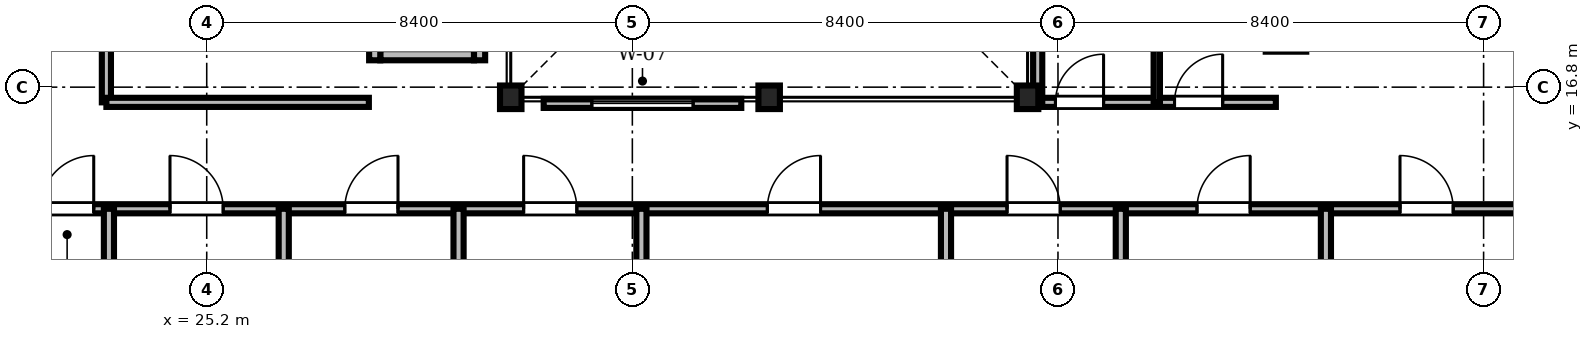
"""IFC4 building model, lengths in metres.
Left out: names, types, materials, properties, quantities, classifications, styles, units other than length and angle.
Written with IfcOpenShell. Run it as: python <this file> out.ifc"""

import sys

from ifc_helpers import new_model, si_unit, direction, frame, frame_2d, origin, origin_2d, place, context, subcontext, project, spatial, rectangle, i_section, extrude, source, transform, mapped, element, fill, save


model = new_model("IFC4")
c1 = context("Model", 3, precision=1e-05, world=origin(), true_north=direction((0.0, 1.0)))
c2 = subcontext(c1, "Body", "Model", "MODEL_VIEW")
j1 = project(units=[si_unit("LENGTHUNIT", "METRE"), si_unit("PLANEANGLEUNIT", "RADIAN")], contexts=[c1])
p1 = place(None, origin())
s1 = spatial("IfcSite", under=j1, at=p1, CompositionType="ELEMENT")
p2 = place(p1, origin())
s2 = spatial("IfcBuilding", under=s1, at=p2, CompositionType="ELEMENT")
p3 = place(p2, frame((0.0, 0.0, 137.2)))
s3 = spatial("IfcBuildingStorey", under=s2, at=p3, CompositionType="ELEMENT", Elevation=137.2)
m1 = source(origin(), c2, "Body", "SweptSolid", [
    extrude(i_section(OverallWidth=0.424, OverallDepth=0.465, WebThickness=0.035, FlangeThickness=0.056, FilletRadius=0.015, at=origin_2d()), origin(), (0.0, 0.0, 1.0), 3.46),
])
for number, where, z_axis, x_axis in (
    (1, (31.2, 16.6, 0.0), (0.0, 0.0, 1.0), (1.0, 0.0, 0.0)),
    (2, (36.3, 16.6, 0.0), (0.0, 0.0, 1.0), (1.0, 0.0, 0.0)),
    (3, (41.4, 16.6, 0.0), (0.0, 0.0, 1.0), (1.0, 0.0, 0.0)),
):
    element("IfcColumn", number, at=place(p3, frame(where, z_axis=z_axis, x_axis=x_axis)), inside=s3, PredefinedType="COLUMN", context=c2, shape_type="MappedRepresentation", body=[
        mapped(m1, transform((0.0, 0.0, 0.0), scale=1.0)),
    ])
m2 = source(origin(), c2, "Body", "SweptSolid", [
    extrude(rectangle(XDim=1.85, YDim=0.22, at=frame_2d((0.925, 0.0))), origin(), (0.0, 0.0, 1.0), 3.46),
])
p4 = place(p3, frame((28.625, 17.44, 0.0), z_axis=(0.0, 0.0, 1.0), x_axis=(1.0, 0.0, 0.0)))
e4 = element("IfcWall", 4, at=p4, inside=s3, PredefinedType="SOLIDWALL", context=c2, shape_type="MappedRepresentation", body=[
    mapped(m2, transform((0.0, 0.0, 0.0), scale=1.0)),
])
m3 = source(origin(), c2, "Body", "SweptSolid", [
    extrude(rectangle(XDim=2.54, YDim=0.22, at=frame_2d((1.27, 0.0))), origin(), (0.0, 0.0, 1.0), 3.46),
])
for number, where, z_axis, x_axis in (
    (5, (28.515, 17.33, 0.0), (0.0, 0.0, 1.0), (0.0, 1.0, 0.0)),
    (6, (30.585, 17.33, 0.0), (0.0, 0.0, 1.0), (0.0, 1.0, 0.0)),
):
    element("IfcWall", number, at=place(p3, frame(where, z_axis=z_axis, x_axis=x_axis)), inside=s3, PredefinedType="SOLIDWALL", context=c2, shape_type="MappedRepresentation", body=[
        mapped(m3, transform((0.0, 0.0, 0.0), scale=1.0)),
    ])
m4 = source(origin(), c2, "Body", "SweptSolid", [
    extrude(rectangle(XDim=46.156, YDim=0.18, at=frame_2d((23.078, 0.0))), origin(), (0.0, 0.0, 1.0), 2.702),
])
p5 = place(p3, frame((6.922, 14.4, 0.0), z_axis=(0.0, 0.0, 1.0), x_axis=(1.0, 0.0, 0.0)))
e7 = element("IfcWall", 7, at=p5, inside=s3, PredefinedType="PARTITIONING", context=c2, shape_type="MappedRepresentation", body=[
    mapped(m4, transform((0.0, 0.0, 0.0), scale=1.0)),
])
m5 = source(origin(), c2, "Body", "SweptSolid", [
    extrude(rectangle(XDim=1.05, YDim=2.2, at=frame_2d((0.525, 1.1))), frame((0.0, 0.1, 0.0), z_axis=(0.0, -1.0, 0.0), x_axis=(1.0, 0.0, 0.0)), (0.0, 0.0, 1.0), 0.2),
])
p6 = place(p5, frame((14.998, 0.0, 0.0)))
e8 = element("IfcOpeningElement", 8, at=p6, cuts=e7, PredefinedType="OPENING", context=c2, shape_type="MappedRepresentation", body=[
    mapped(m5, transform((0.0, 0.0, 0.0), scale=1.0)),
])
p7 = place(p5, frame((17.553, 0.0, 0.0)))
e9 = element("IfcOpeningElement", 9, at=p7, cuts=e7, PredefinedType="OPENING", context=c2, shape_type="MappedRepresentation", body=[
    mapped(m5, transform((0.0, 0.0, 0.0), scale=1.0)),
])
p8 = place(p5, frame((21.003, 0.0, 0.0)))
e10 = element("IfcOpeningElement", 10, at=p8, cuts=e7, PredefinedType="OPENING", context=c2, shape_type="MappedRepresentation", body=[
    mapped(m5, transform((0.0, 0.0, 0.0), scale=1.0)),
])
p9 = place(p5, frame((24.532, 0.0, 0.0)))
e11 = element("IfcOpeningElement", 11, at=p9, cuts=e7, PredefinedType="OPENING", context=c2, shape_type="MappedRepresentation", body=[
    mapped(m5, transform((0.0, 0.0, 0.0), scale=1.0)),
])
p10 = place(p5, frame((29.342, 0.0, 0.0)))
e12 = element("IfcOpeningElement", 12, at=p10, cuts=e7, PredefinedType="OPENING", context=c2, shape_type="MappedRepresentation", body=[
    mapped(m5, transform((0.0, 0.0, 0.0), scale=1.0)),
])
p11 = place(p5, frame((34.073, 0.0, 0.0)))
e13 = element("IfcOpeningElement", 13, at=p11, cuts=e7, PredefinedType="OPENING", context=c2, shape_type="MappedRepresentation", body=[
    mapped(m5, transform((0.0, 0.0, 0.0), scale=1.0)),
])
p12 = place(p5, frame((37.822, 0.0, 0.0)))
e14 = element("IfcOpeningElement", 14, at=p12, cuts=e7, PredefinedType="OPENING", context=c2, shape_type="MappedRepresentation", body=[
    mapped(m5, transform((0.0, 0.0, 0.0), scale=1.0)),
])
p13 = place(p5, frame((41.828, 0.0, 0.0)))
e15 = element("IfcOpeningElement", 15, at=p13, cuts=e7, PredefinedType="OPENING", context=c2, shape_type="MappedRepresentation", body=[
    mapped(m5, transform((0.0, 0.0, 0.0), scale=1.0)),
])
m6 = source(origin(), c2, "Body", "SweptSolid", [
    extrude(rectangle(XDim=4.7, YDim=0.18, at=frame_2d((2.35, 0.0))), origin(), (0.0, 0.0, 1.0), 2.852),
])
p14 = place(p3, frame((41.6, 16.5, 0.0), z_axis=(0.0, 0.0, 1.0), x_axis=(1.0, 0.0, 0.0)))
e16 = element("IfcWall", 16, at=p14, inside=s3, PredefinedType="PARTITIONING", context=c2, shape_type="MappedRepresentation", body=[
    mapped(m6, transform((0.0, 0.0, 0.0), scale=1.0)),
])
m7 = source(origin(), c2, "Body", "SweptSolid", [
    extrude(rectangle(XDim=0.95, YDim=2.15, at=frame_2d((0.475, 1.075))), frame((0.0, 0.1, 0.0), z_axis=(0.0, -1.0, 0.0), x_axis=(1.0, 0.0, 0.0)), (0.0, 0.0, 1.0), 0.2),
])
p15 = place(p14, frame((0.35, 0.0, 0.0)))
e17 = element("IfcOpeningElement", 17, at=p15, cuts=e16, PredefinedType="OPENING", context=c2, shape_type="MappedRepresentation", body=[
    mapped(m7, transform((0.0, 0.0, 0.0), scale=1.0)),
])
p16 = place(p14, frame((2.7, 0.0, 0.0)))
e18 = element("IfcOpeningElement", 18, at=p16, cuts=e16, PredefinedType="OPENING", context=c2, shape_type="MappedRepresentation", body=[
    mapped(m7, transform((0.0, 0.0, 0.0), scale=1.0)),
])
m8 = source(origin(), c2, "Body", "SweptSolid", [
    extrude(rectangle(XDim=3.55, YDim=0.18, at=frame_2d((1.775, 0.0))), origin(), (0.0, 0.0, 1.0), 2.852),
])
p17 = place(p3, frame((23.22, 16.5, 0.0), z_axis=(0.0, 0.0, 1.0), x_axis=(0.0, 1.0, 0.0)))
e19 = element("IfcWall", 19, at=p17, inside=s3, PredefinedType="PARTITIONING", context=c2, shape_type="MappedRepresentation", body=[
    mapped(m8, transform((0.0, 0.0, 0.0), scale=1.0)),
])
p18 = place(p17, frame((1.15, 0.0, 0.0)))
e20 = element("IfcOpeningElement", 20, at=p18, cuts=e19, PredefinedType="OPENING", context=c2, shape_type="MappedRepresentation", body=[
    mapped(m5, transform((0.0, 0.0, 0.0), scale=1.0)),
])
m9 = source(origin(), c2, "Body", "SweptSolid", [
    extrude(rectangle(XDim=12.278, YDim=0.2, at=frame_2d((6.139, 0.0))), origin(), (0.0, 0.0, 1.0), 2.702),
])
p19 = place(p3, frame((23.27, 2.122, 0.0), z_axis=(0.0, 0.0, 1.0), x_axis=(0.0, 1.0, 0.0)))
e21 = element("IfcWall", 21, at=p19, inside=s3, PredefinedType="PARTITIONING", context=c2, shape_type="MappedRepresentation", body=[
    mapped(m9, transform((0.0, 0.0, 0.0), scale=1.0)),
])
m10 = source(origin(), c2, "Body", "SweptSolid", [
    extrude(rectangle(XDim=12.47, YDim=0.2, at=frame_2d((6.235, 0.0))), origin(), (0.0, 0.0, 1.0), 2.702),
])
for number, where, z_axis, x_axis in (
    (22, (26.72, 1.93, 0.0), (0.0, 0.0, 1.0), (0.0, 1.0, 0.0)),
    (23, (30.17, 1.93, 0.0), (0.0, 0.0, 1.0), (0.0, 1.0, 0.0)),
):
    element("IfcWall", number, at=place(p3, frame(where, z_axis=z_axis, x_axis=x_axis)), inside=s3, PredefinedType="PARTITIONING", context=c2, shape_type="MappedRepresentation", body=[
        mapped(m10, transform((0.0, 0.0, 0.0), scale=1.0)),
    ])
for number, where, z_axis, x_axis in (
    (24, (33.779, 2.122, 0.0), (0.0, 0.0, 1.0), (0.0, 1.0, 0.0)),
    (25, (39.79, 2.122, 0.0), (0.0, 0.0, 1.0), (0.0, 1.0, 0.0)),
    (26, (43.24, 2.122, 0.0), (0.0, 0.0, 1.0), (0.0, 1.0, 0.0)),
    (27, (47.288, 2.122, 0.0), (0.0, 0.0, 1.0), (0.0, 1.0, 0.0)),
):
    element("IfcWall", number, at=place(p3, frame(where, z_axis=z_axis, x_axis=x_axis)), inside=s3, PredefinedType="PARTITIONING", context=c2, shape_type="MappedRepresentation", body=[
        mapped(m9, transform((0.0, 0.0, 0.0), scale=1.0)),
    ])
m11 = source(origin(), c2, "Body", "SweptSolid", [
    extrude(rectangle(XDim=7.15, YDim=0.18, at=frame_2d((3.575, 0.0))), origin(), (0.0, 0.0, 1.0), 2.852),
])
p20 = place(p3, frame((41.6, 16.5, 0.0), z_axis=(0.0, 0.0, 1.0), x_axis=(0.0, 1.0, 0.0)))
e28 = element("IfcWall", 28, at=p20, inside=s3, PredefinedType="PARTITIONING", context=c2, shape_type="MappedRepresentation", body=[
    mapped(m11, transform((0.0, 0.0, 0.0), scale=1.0)),
])
m12 = source(origin(), c2, "Body", "SweptSolid", [
    extrude(rectangle(XDim=7.15, YDim=0.125, at=frame_2d((3.575, 0.0))), origin(), (0.0, 0.0, 1.0), 2.852),
])
p21 = place(p3, frame((43.95, 16.5, 0.0), z_axis=(0.0, 0.0, 1.0), x_axis=(0.0, 1.0, 0.0)))
e29 = element("IfcWall", 29, at=p21, inside=s3, PredefinedType="PARTITIONING", context=c2, shape_type="MappedRepresentation", body=[
    mapped(m12, transform((0.0, 0.0, 0.0), scale=1.0)),
])
m13 = source(origin(), c2, "Body", "SweptSolid", [
    extrude(rectangle(XDim=5.18, YDim=0.18, at=frame_2d((2.59, 0.0))), origin(), (0.0, 0.0, 1.0), 3.46),
])
p22 = place(p3, frame((23.22, 16.5, 0.0), z_axis=(0.0, 0.0, 1.0), x_axis=(1.0, 0.0, 0.0)))
e30 = element("IfcWall", 30, at=p22, inside=s3, PredefinedType="PARTITIONING", context=c2, shape_type="MappedRepresentation", body=[
    mapped(m13, transform((0.0, 0.0, 0.0), scale=1.0)),
])
m14 = source(origin(), c2, "Body", "SweptSolid", [
    extrude(rectangle(XDim=3.9, YDim=0.18, at=frame_2d((1.95, 0.0))), origin(), (0.0, 0.0, 1.0), 3.002),
])
p23 = place(p3, frame((31.85, 16.48, 0.0), z_axis=(0.0, 0.0, 1.0), x_axis=(1.0, 0.0, 0.0)))
e31 = element("IfcWall", 31, at=p23, inside=s3, PredefinedType="PARTITIONING", context=c2, shape_type="MappedRepresentation", body=[
    mapped(m14, transform((0.0, 0.0, 0.0), scale=1.0)),
])
m15 = source(origin(), c2, "Body", "SweptSolid", [
    extrude(rectangle(XDim=2.0, YDim=1.9, at=frame_2d((1.0, 0.95))), frame((0.0, 0.1, 0.0), z_axis=(0.0, -1.0, 0.0), x_axis=(1.0, 0.0, 0.0)), (0.0, 0.0, 1.0), 0.2),
])
p24 = place(p23, frame((0.95, 0.0, 0.55)))
e32 = element("IfcOpeningElement", 32, at=p24, cuts=e31, PredefinedType="OPENING", context=c2, shape_type="MappedRepresentation", body=[
    mapped(m15, transform((0.0, 0.0, 0.0), scale=1.0)),
])
m16 = source(origin(), c2, "Body", "SweptSolid", [
    extrude(rectangle(XDim=1.05, YDim=2.2, at=frame_2d((0.525, 1.1))), frame((0.0, 0.025, 0.0), z_axis=(0.0, -1.0, 0.0), x_axis=(1.0, 0.0, 0.0)), (0.0, 0.0, 1.0), 0.05),
])
p25 = place(p6, origin())
e33 = element("IfcDoor", 33, at=p25, inside=s3, OperationType="SINGLE_SWING_RIGHT", PredefinedType="DOOR", context=c2, shape_type="MappedRepresentation", body=[
    mapped(m16, transform((0.0, 0.0, 0.0), scale=1.0)),
])
fill(e8, e33)
p26 = place(p7, origin())
e34 = element("IfcDoor", 34, at=p26, inside=s3, OperationType="SINGLE_SWING_LEFT", PredefinedType="DOOR", context=c2, shape_type="MappedRepresentation", body=[
    mapped(m16, transform((0.0, 0.0, 0.0), scale=1.0)),
])
fill(e9, e34)
p27 = place(p8, origin())
e35 = element("IfcDoor", 35, at=p27, inside=s3, OperationType="SINGLE_SWING_RIGHT", PredefinedType="DOOR", context=c2, shape_type="MappedRepresentation", body=[
    mapped(m16, transform((0.0, 0.0, 0.0), scale=1.0)),
])
fill(e10, e35)
p28 = place(p9, origin())
e36 = element("IfcDoor", 36, at=p28, inside=s3, OperationType="SINGLE_SWING_LEFT", PredefinedType="DOOR", context=c2, shape_type="MappedRepresentation", body=[
    mapped(m16, transform((0.0, 0.0, 0.0), scale=1.0)),
])
fill(e11, e36)
p29 = place(p10, origin())
e37 = element("IfcDoor", 37, at=p29, inside=s3, OperationType="SINGLE_SWING_RIGHT", PredefinedType="DOOR", context=c2, shape_type="MappedRepresentation", body=[
    mapped(m16, transform((0.0, 0.0, 0.0), scale=1.0)),
])
fill(e12, e37)
p30 = place(p11, origin())
e38 = element("IfcDoor", 38, at=p30, inside=s3, OperationType="SINGLE_SWING_LEFT", PredefinedType="DOOR", context=c2, shape_type="MappedRepresentation", body=[
    mapped(m16, transform((0.0, 0.0, 0.0), scale=1.0)),
])
fill(e13, e38)
p31 = place(p12, origin())
e39 = element("IfcDoor", 39, at=p31, inside=s3, OperationType="SINGLE_SWING_RIGHT", PredefinedType="DOOR", context=c2, shape_type="MappedRepresentation", body=[
    mapped(m16, transform((0.0, 0.0, 0.0), scale=1.0)),
])
fill(e14, e39)
p32 = place(p13, origin())
e40 = element("IfcDoor", 40, at=p32, inside=s3, OperationType="SINGLE_SWING_LEFT", PredefinedType="DOOR", context=c2, shape_type="MappedRepresentation", body=[
    mapped(m16, transform((0.0, 0.0, 0.0), scale=1.0)),
])
fill(e15, e40)
m17 = source(origin(), c2, "Body", "SweptSolid", [
    extrude(rectangle(XDim=0.95, YDim=2.15, at=frame_2d((0.475, 1.075))), frame((0.0, 0.025, 0.0), z_axis=(0.0, -1.0, 0.0), x_axis=(1.0, 0.0, 0.0)), (0.0, 0.0, 1.0), 0.05),
])
p33 = place(p15, origin())
e41 = element("IfcDoor", 41, at=p33, inside=s3, OperationType="SINGLE_SWING_RIGHT", PredefinedType="DOOR", context=c2, shape_type="MappedRepresentation", body=[
    mapped(m17, transform((0.0, 0.0, 0.0), scale=1.0)),
])
fill(e17, e41)
p34 = place(p16, origin())
e42 = element("IfcDoor", 42, at=p34, inside=s3, OperationType="SINGLE_SWING_RIGHT", PredefinedType="DOOR", context=c2, shape_type="MappedRepresentation", body=[
    mapped(m17, transform((0.0, 0.0, 0.0), scale=1.0)),
])
fill(e18, e42)
m18 = source(origin(), c2, "Body", "SweptSolid", [
    extrude(rectangle(XDim=2.0, YDim=1.9, at=frame_2d((1.0, 0.95))), frame((0.0, 0.03, 0.0), z_axis=(0.0, -1.0, 0.0), x_axis=(1.0, 0.0, 0.0)), (0.0, 0.0, 1.0), 0.06),
])
p35 = place(p24, origin())
e43 = element("IfcWindow", 43, at=p35, inside=s3, PartitioningType="SINGLE_PANEL", PredefinedType="WINDOW", context=c2, shape_type="MappedRepresentation", body=[
    mapped(m18, transform((0.0, 0.0, 0.0), scale=1.0)),
])
fill(e32, e43)
save(model, sys.argv[1])
